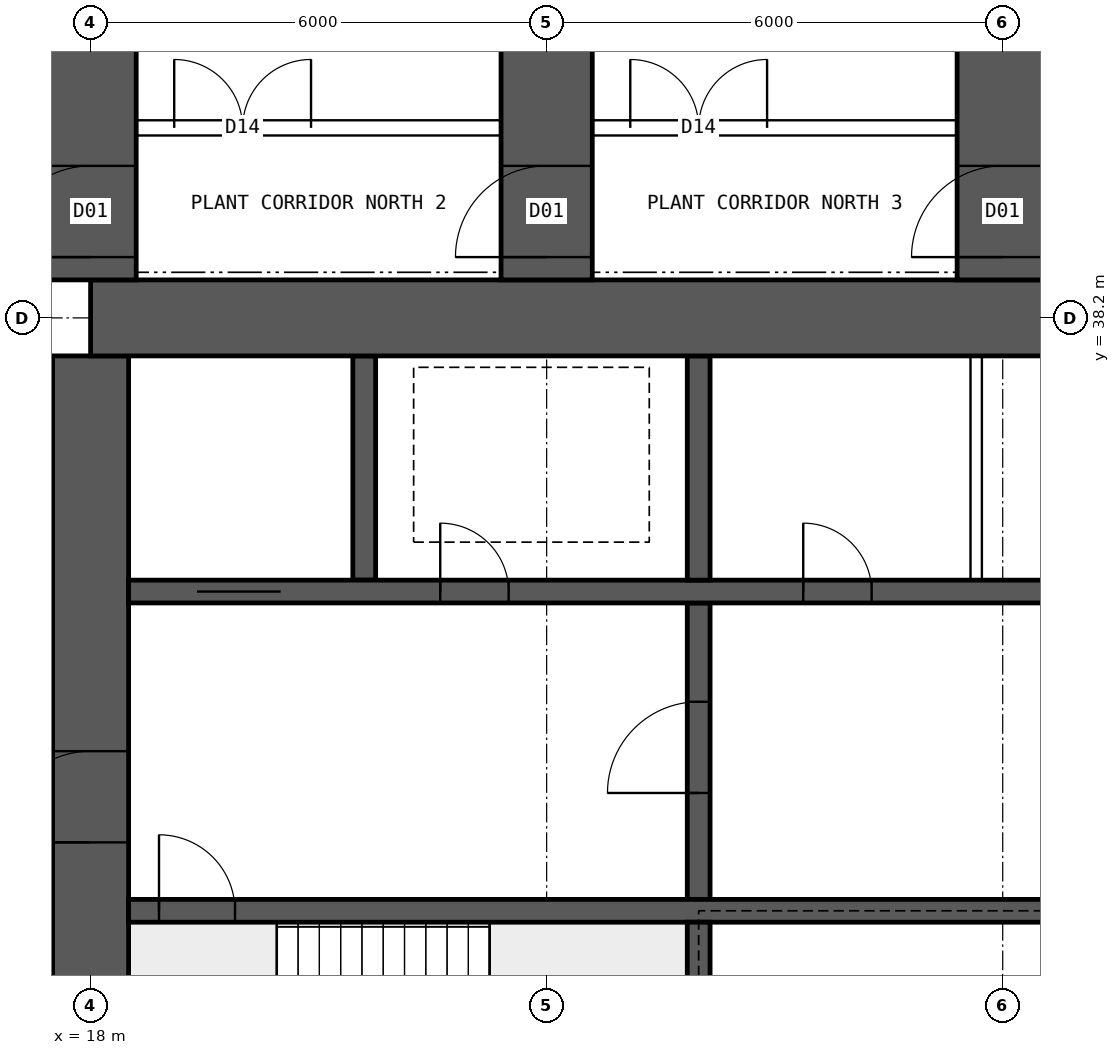
"""IFC4 building model, lengths in metres.
Left out: names, types, materials, properties, quantities, classifications, styles, units other than length and angle.
Written with IfcOpenShell. Run it as: python <this file> out.ifc"""

import sys

from ifc_helpers import new_model, si_unit, direction, frame, frame_2d, origin, place, context, subcontext, project, spatial, rectangle, extrude, element, fill, save


model = new_model("IFC4")
c1 = context("Model", 3, precision=1e-05, world=origin(), true_north=direction((0.0, 1.0)))
c2 = subcontext(c1, "Body", "Model", "MODEL_VIEW")
j1 = project(units=[si_unit("LENGTHUNIT", "METRE"), si_unit("PLANEANGLEUNIT", "RADIAN")], contexts=[c1])
p1 = place(None, origin())
s1 = spatial("IfcSite", under=j1, at=p1, CompositionType="ELEMENT")
p2 = place(p1, origin())
s2 = spatial("IfcBuilding", under=s1, at=p2, CompositionType="ELEMENT")
p3 = place(p2, frame((0.0, 0.0, 68.95)))
s3 = spatial("IfcBuildingStorey", under=s2, at=p3, CompositionType="ELEMENT", Elevation=68.95)
p4 = place(p3, frame((18.0, 38.2, 0.0), z_axis=(0.0, 0.0, 1.0), x_axis=(1.0, 0.0, 0.0)))
e1 = element("IfcWall", 1, at=p4, inside=s3, PredefinedType="SHEAR", context=c2, shape_type="SweptSolid", body=[
    extrude(rectangle(XDim=48.0, YDim=1.0, at=frame_2d((24.0, 0.0))), origin(), (0.0, 0.0, 1.0), 7.2),
])
p5 = place(p3, frame((18.0, 26.3, 0.0), z_axis=(0.0, 0.0, 1.0), x_axis=(0.0, 1.0, 0.0)))
e2 = element("IfcWall", 2, at=p5, inside=s3, PredefinedType="SHEAR", context=c2, shape_type="SweptSolid", body=[
    extrude(rectangle(XDim=11.4, YDim=1.0, at=frame_2d((5.7, 0.0))), origin(), (0.0, 0.0, 1.0), 7.2),
])
p6 = place(p5, frame((5.0, 0.0, 0.0)))
e3 = element("IfcOpeningElement", 3, at=p6, cuts=e2, PredefinedType="OPENING", context=c2, shape_type="SweptSolid", body=[
    extrude(rectangle(XDim=1.2, YDim=2.1, at=frame_2d((0.6, 1.05))), frame((0.0, 0.51, 0.0), z_axis=(0.0, -1.0, 0.0), x_axis=(1.0, 0.0, 0.0)), (0.0, 0.0, 1.0), 1.02),
])
p7 = place(p3, frame((18.5, 30.4, 0.0), z_axis=(0.0, 0.0, 1.0), x_axis=(1.0, 0.0, 0.0)))
e4 = element("IfcWall", 4, at=p7, inside=s3, PredefinedType="SHEAR", context=c2, shape_type="SweptSolid", body=[
    extrude(rectangle(XDim=47.0, YDim=0.3, at=frame_2d((23.5, 0.0))), origin(), (0.0, 0.0, 1.0), 7.2),
])
p8 = place(p7, frame((0.4, 0.0, 0.0)))
e5 = element("IfcOpeningElement", 5, at=p8, cuts=e4, PredefinedType="OPENING", context=c2, shape_type="SweptSolid", body=[
    extrude(rectangle(XDim=1.0, YDim=2.1, at=frame_2d((0.5, 1.05))), frame((0.0, 0.16, 0.0), z_axis=(0.0, -1.0, 0.0), x_axis=(1.0, 0.0, 0.0)), (0.0, 0.0, 1.0), 0.32),
])
p9 = place(p7, frame((45.6, 0.0, 0.0)))
e6 = element("IfcOpeningElement", 6, at=p9, cuts=e4, PredefinedType="OPENING", context=c2, shape_type="SweptSolid", body=[
    extrude(rectangle(XDim=1.0, YDim=2.1, at=frame_2d((0.5, 1.05))), frame((0.0, 0.16, 0.0), z_axis=(0.0, -1.0, 0.0), x_axis=(1.0, 0.0, 0.0)), (0.0, 0.0, 1.0), 0.32),
])
p10 = place(p7, frame((30.117, 0.0, 0.0)))
e7 = element("IfcOpeningElement", 7, at=p10, cuts=e4, PredefinedType="OPENING", context=c2, shape_type="SweptSolid", body=[
    extrude(rectangle(XDim=1.1, YDim=2.1, at=frame_2d((0.55, 1.05))), frame((0.0, 0.16, 0.0), z_axis=(0.0, -1.0, 0.0), x_axis=(1.0, 0.0, 0.0)), (0.0, 0.0, 1.0), 0.32),
])
p11 = place(p7, frame((33.65, 0.0, 0.0)))
e8 = element("IfcOpeningElement", 8, at=p11, cuts=e4, PredefinedType="OPENING", context=c2, shape_type="SweptSolid", body=[
    extrude(rectangle(XDim=1.1, YDim=2.1, at=frame_2d((0.55, 1.05))), frame((0.0, 0.16, 0.0), z_axis=(0.0, -1.0, 0.0), x_axis=(1.0, 0.0, 0.0)), (0.0, 0.0, 1.0), 0.32),
])
p12 = place(p7, frame((37.183, 0.0, 0.0)))
e9 = element("IfcOpeningElement", 9, at=p12, cuts=e4, PredefinedType="OPENING", context=c2, shape_type="SweptSolid", body=[
    extrude(rectangle(XDim=1.1, YDim=2.1, at=frame_2d((0.55, 1.05))), frame((0.0, 0.16, 0.0), z_axis=(0.0, -1.0, 0.0), x_axis=(1.0, 0.0, 0.0)), (0.0, 0.0, 1.0), 0.32),
])
p13 = place(p3, frame((18.5, 34.6, 0.0), z_axis=(0.0, 0.0, 1.0), x_axis=(1.0, 0.0, 0.0)))
e10 = element("IfcWall", 10, at=p13, inside=s3, PredefinedType="SHEAR", context=c2, shape_type="SweptSolid", body=[
    extrude(rectangle(XDim=47.0, YDim=0.3, at=frame_2d((23.5, 0.0))), origin(), (0.0, 0.0, 1.0), 7.2),
])
p14 = place(p13, frame((0.9, 0.0, 0.0)))
e11 = element("IfcOpeningElement", 11, at=p14, cuts=e10, PredefinedType="OPENING", context=c2, shape_type="SweptSolid", body=[
    extrude(rectangle(XDim=1.1, YDim=2.1, at=frame_2d((0.55, 1.05))), frame((0.0, 0.16, 0.0), z_axis=(0.0, -1.0, 0.0), x_axis=(1.0, 0.0, 0.0)), (0.0, 0.0, 1.0), 0.32),
])
p15 = place(p13, frame((45.0, 0.0, 0.0)))
e12 = element("IfcOpeningElement", 12, at=p15, cuts=e10, PredefinedType="OPENING", context=c2, shape_type="SweptSolid", body=[
    extrude(rectangle(XDim=1.1, YDim=2.1, at=frame_2d((0.55, 1.05))), frame((0.0, 0.16, 0.0), z_axis=(0.0, -1.0, 0.0), x_axis=(1.0, 0.0, 0.0)), (0.0, 0.0, 1.0), 0.32),
])
p16 = place(p13, frame((4.1, 0.0, 0.0)))
e13 = element("IfcOpeningElement", 13, at=p16, cuts=e10, PredefinedType="OPENING", context=c2, shape_type="SweptSolid", body=[
    extrude(rectangle(XDim=0.9, YDim=2.1, at=frame_2d((0.45, 1.05))), frame((0.0, 0.16, 0.0), z_axis=(0.0, -1.0, 0.0), x_axis=(1.0, 0.0, 0.0)), (0.0, 0.0, 1.0), 0.32),
])
p17 = place(p13, frame((42.0, 0.0, 0.0)))
e14 = element("IfcOpeningElement", 14, at=p17, cuts=e10, PredefinedType="OPENING", context=c2, shape_type="SweptSolid", body=[
    extrude(rectangle(XDim=0.9, YDim=2.1, at=frame_2d((0.45, 1.05))), frame((0.0, 0.16, 0.0), z_axis=(0.0, -1.0, 0.0), x_axis=(1.0, 0.0, 0.0)), (0.0, 0.0, 1.0), 0.32),
])
p18 = place(p13, frame((8.875, 0.0, 0.0)))
e15 = element("IfcOpeningElement", 15, at=p18, cuts=e10, PredefinedType="OPENING", context=c2, shape_type="SweptSolid", body=[
    extrude(rectangle(XDim=0.9, YDim=2.1, at=frame_2d((0.45, 1.05))), frame((0.0, 0.16, 0.0), z_axis=(0.0, -1.0, 0.0), x_axis=(1.0, 0.0, 0.0)), (0.0, 0.0, 1.0), 0.32),
])
p19 = place(p13, frame((12.849, 0.0, 0.0)))
e16 = element("IfcOpeningElement", 16, at=p19, cuts=e10, PredefinedType="OPENING", context=c2, shape_type="SweptSolid", body=[
    extrude(rectangle(XDim=0.9, YDim=2.1, at=frame_2d((0.45, 1.05))), frame((0.0, 0.16, 0.0), z_axis=(0.0, -1.0, 0.0), x_axis=(1.0, 0.0, 0.0)), (0.0, 0.0, 1.0), 0.32),
])
p20 = place(p13, frame((16.496, 0.0, 0.0)))
e17 = element("IfcOpeningElement", 17, at=p20, cuts=e10, PredefinedType="OPENING", context=c2, shape_type="SweptSolid", body=[
    extrude(rectangle(XDim=0.9, YDim=2.1, at=frame_2d((0.45, 1.05))), frame((0.0, 0.16, 0.0), z_axis=(0.0, -1.0, 0.0), x_axis=(1.0, 0.0, 0.0)), (0.0, 0.0, 1.0), 0.32),
])
p21 = place(p13, frame((20.255, 0.0, 0.0)))
e18 = element("IfcOpeningElement", 18, at=p21, cuts=e10, PredefinedType="OPENING", context=c2, shape_type="SweptSolid", body=[
    extrude(rectangle(XDim=0.9, YDim=2.1, at=frame_2d((0.45, 1.05))), frame((0.0, 0.16, 0.0), z_axis=(0.0, -1.0, 0.0), x_axis=(1.0, 0.0, 0.0)), (0.0, 0.0, 1.0), 0.32),
])
p22 = place(p13, frame((24.661, 0.0, 0.0)))
e19 = element("IfcOpeningElement", 19, at=p22, cuts=e10, PredefinedType="OPENING", context=c2, shape_type="SweptSolid", body=[
    extrude(rectangle(XDim=0.9, YDim=2.1, at=frame_2d((0.45, 1.05))), frame((0.0, 0.16, 0.0), z_axis=(0.0, -1.0, 0.0), x_axis=(1.0, 0.0, 0.0)), (0.0, 0.0, 1.0), 0.32),
])
p23 = place(p13, frame((27.458, 0.0, 0.0)))
e20 = element("IfcOpeningElement", 20, at=p23, cuts=e10, PredefinedType="OPENING", context=c2, shape_type="SweptSolid", body=[
    extrude(rectangle(XDim=0.9, YDim=2.1, at=frame_2d((0.45, 1.05))), frame((0.0, 0.16, 0.0), z_axis=(0.0, -1.0, 0.0), x_axis=(1.0, 0.0, 0.0)), (0.0, 0.0, 1.0), 0.32),
])
p24 = place(p13, frame((29.831, 0.0, 0.0)))
e21 = element("IfcOpeningElement", 21, at=p24, cuts=e10, PredefinedType="OPENING", context=c2, shape_type="SweptSolid", body=[
    extrude(rectangle(XDim=0.9, YDim=2.1, at=frame_2d((0.45, 1.05))), frame((0.0, 0.16, 0.0), z_axis=(0.0, -1.0, 0.0), x_axis=(1.0, 0.0, 0.0)), (0.0, 0.0, 1.0), 0.32),
])
p25 = place(p13, frame((33.68, 0.0, 0.0)))
e22 = element("IfcOpeningElement", 22, at=p25, cuts=e10, PredefinedType="OPENING", context=c2, shape_type="SweptSolid", body=[
    extrude(rectangle(XDim=0.9, YDim=2.1, at=frame_2d((0.45, 1.05))), frame((0.0, 0.16, 0.0), z_axis=(0.0, -1.0, 0.0), x_axis=(1.0, 0.0, 0.0)), (0.0, 0.0, 1.0), 0.32),
])
p26 = place(p13, frame((37.429, 0.0, 0.0)))
e23 = element("IfcOpeningElement", 23, at=p26, cuts=e10, PredefinedType="OPENING", context=c2, shape_type="SweptSolid", body=[
    extrude(rectangle(XDim=0.9, YDim=2.1, at=frame_2d((0.45, 1.05))), frame((0.0, 0.16, 0.0), z_axis=(0.0, -1.0, 0.0), x_axis=(1.0, 0.0, 0.0)), (0.0, 0.0, 1.0), 0.32),
])
p27 = place(p3, frame((26.0, 26.3, 0.0), z_axis=(0.0, 0.0, 1.0), x_axis=(0.0, 1.0, 0.0)))
e24 = element("IfcWall", 24, at=p27, inside=s3, PredefinedType="SHEAR", context=c2, shape_type="SweptSolid", body=[
    extrude(rectangle(XDim=3.95, YDim=0.3, at=frame_2d((1.975, 0.0))), origin(), (0.0, 0.0, 1.0), 7.2),
])
p28 = place(p3, frame((26.0, 30.55, 0.0), z_axis=(0.0, 0.0, 1.0), x_axis=(0.0, 1.0, 0.0)))
e25 = element("IfcWall", 25, at=p28, inside=s3, PredefinedType="SHEAR", context=c2, shape_type="SweptSolid", body=[
    extrude(rectangle(XDim=3.9, YDim=0.3, at=frame_2d((1.95, 0.0))), origin(), (0.0, 0.0, 1.0), 7.2),
])
p29 = place(p28, frame((1.4, 0.0, 0.0)))
e26 = element("IfcOpeningElement", 26, at=p29, cuts=e25, PredefinedType="OPENING", context=c2, shape_type="SweptSolid", body=[
    extrude(rectangle(XDim=1.2, YDim=2.1, at=frame_2d((0.6, 1.05))), frame((0.0, 0.16, 0.0), z_axis=(0.0, -1.0, 0.0), x_axis=(1.0, 0.0, 0.0)), (0.0, 0.0, 1.0), 0.32),
])
for number, where, z_axis, x_axis in (
    (27, (21.6, 34.75, 0.0), (0.0, 0.0, 1.0), (0.0, 1.0, 0.0)),
    (28, (26.0, 34.75, 0.0), (0.0, 0.0, 1.0), (0.0, 1.0, 0.0)),
):
    element("IfcWall", number, at=place(p3, frame(where, z_axis=z_axis, x_axis=x_axis)), inside=s3, PredefinedType="SHEAR", context=c2, shape_type="SweptSolid", body=[
        extrude(rectangle(XDim=2.95, YDim=0.3, at=frame_2d((1.475, 0.0))), origin(), (0.0, 0.0, 1.0), 7.2),
    ])
p30 = place(p3, frame((18.0, 38.7, 0.0), z_axis=(0.0, 0.0, 1.0), x_axis=(0.0, 1.0, 0.0)))
e29 = element("IfcWall", 29, at=p30, inside=s3, PredefinedType="SHEAR", context=c2, shape_type="SweptSolid", body=[
    extrude(rectangle(XDim=17.6, YDim=1.2, at=frame_2d((8.8, 0.0))), origin(), (0.0, 0.0, 1.0), 7.2),
])
p31 = place(p30, frame((0.3, 0.0, 0.0)))
e30 = element("IfcOpeningElement", 30, at=p31, cuts=e29, PredefinedType="OPENING", context=c2, shape_type="SweptSolid", body=[
    extrude(rectangle(XDim=1.2, YDim=2.1, at=frame_2d((0.6, 1.05))), frame((0.0, 0.61, 0.0), z_axis=(0.0, -1.0, 0.0), x_axis=(1.0, 0.0, 0.0)), (0.0, 0.0, 1.0), 1.22),
])
p32 = place(p3, frame((24.0, 38.7, 0.0), z_axis=(0.0, 0.0, 1.0), x_axis=(0.0, 1.0, 0.0)))
e31 = element("IfcWall", 31, at=p32, inside=s3, PredefinedType="SHEAR", context=c2, shape_type="SweptSolid", body=[
    extrude(rectangle(XDim=17.6, YDim=1.2, at=frame_2d((8.8, 0.0))), origin(), (0.0, 0.0, 1.0), 7.2),
])
p33 = place(p32, frame((0.3, 0.0, 0.0)))
e32 = element("IfcOpeningElement", 32, at=p33, cuts=e31, PredefinedType="OPENING", context=c2, shape_type="SweptSolid", body=[
    extrude(rectangle(XDim=1.2, YDim=2.1, at=frame_2d((0.6, 1.05))), frame((0.0, 0.61, 0.0), z_axis=(0.0, -1.0, 0.0), x_axis=(1.0, 0.0, 0.0)), (0.0, 0.0, 1.0), 1.22),
])
p34 = place(p3, frame((30.0, 38.7, 0.0), z_axis=(0.0, 0.0, 1.0), x_axis=(0.0, 1.0, 0.0)))
e33 = element("IfcWall", 33, at=p34, inside=s3, PredefinedType="SHEAR", context=c2, shape_type="SweptSolid", body=[
    extrude(rectangle(XDim=17.6, YDim=1.2, at=frame_2d((8.8, 0.0))), origin(), (0.0, 0.0, 1.0), 7.2),
])
p35 = place(p34, frame((0.3, 0.0, 0.0)))
e34 = element("IfcOpeningElement", 34, at=p35, cuts=e33, PredefinedType="OPENING", context=c2, shape_type="SweptSolid", body=[
    extrude(rectangle(XDim=1.2, YDim=2.1, at=frame_2d((0.6, 1.05))), frame((0.0, 0.61, 0.0), z_axis=(0.0, -1.0, 0.0), x_axis=(1.0, 0.0, 0.0)), (0.0, 0.0, 1.0), 1.22),
])
p36 = place(p3, frame((29.651, 34.75, 0.0), z_axis=(0.0, 0.0, 1.0), x_axis=(0.0, 1.0, 0.0)))
e35 = element("IfcWall", 35, at=p36, inside=s3, PredefinedType="SOLIDWALL", context=c2, shape_type="SweptSolid", body=[
    extrude(rectangle(XDim=2.95, YDim=0.15, at=frame_2d((1.475, 0.0))), origin(), (0.0, 0.0, 1.0), 6.9),
])
p37 = place(p3, frame((15.6, 40.7, 0.0), z_axis=(0.0, 0.0, 1.0), x_axis=(1.0, 0.0, 0.0)))
e36 = element("IfcWall", 36, at=p37, inside=s3, PredefinedType="SOLIDWALL", context=c2, shape_type="SweptSolid", body=[
    extrude(rectangle(XDim=52.8, YDim=0.2, at=frame_2d((26.4, 0.0))), origin(), (0.0, 0.0, 1.0), 6.9),
])
p38 = place(p37, frame((0.6, 0.0, 0.0)))
e37 = element("IfcOpeningElement", 37, at=p38, cuts=e36, PredefinedType="OPENING", context=c2, shape_type="SweptSolid", body=[
    extrude(rectangle(XDim=1.2, YDim=2.1, at=frame_2d((0.6, 1.05))), frame((0.0, 0.11, 0.0), z_axis=(0.0, -1.0, 0.0), x_axis=(1.0, 0.0, 0.0)), (0.0, 0.0, 1.0), 0.22),
])
p39 = place(p37, frame((3.5, 0.0, 0.0)))
e38 = element("IfcOpeningElement", 38, at=p39, cuts=e36, PredefinedType="OPENING", context=c2, shape_type="SweptSolid", body=[
    extrude(rectangle(XDim=1.8, YDim=2.4, at=frame_2d((0.9, 1.2))), frame((0.0, 0.11, 0.0), z_axis=(0.0, -1.0, 0.0), x_axis=(1.0, 0.0, 0.0)), (0.0, 0.0, 1.0), 0.22),
])
p40 = place(p37, frame((9.5, 0.0, 0.0)))
e39 = element("IfcOpeningElement", 39, at=p40, cuts=e36, PredefinedType="OPENING", context=c2, shape_type="SweptSolid", body=[
    extrude(rectangle(XDim=1.8, YDim=2.4, at=frame_2d((0.9, 1.2))), frame((0.0, 0.11, 0.0), z_axis=(0.0, -1.0, 0.0), x_axis=(1.0, 0.0, 0.0)), (0.0, 0.0, 1.0), 0.22),
])
p41 = place(p37, frame((15.5, 0.0, 0.0)))
e40 = element("IfcOpeningElement", 40, at=p41, cuts=e36, PredefinedType="OPENING", context=c2, shape_type="SweptSolid", body=[
    extrude(rectangle(XDim=1.8, YDim=2.4, at=frame_2d((0.9, 1.2))), frame((0.0, 0.11, 0.0), z_axis=(0.0, -1.0, 0.0), x_axis=(1.0, 0.0, 0.0)), (0.0, 0.0, 1.0), 0.22),
])
p42 = place(p37, frame((21.5, 0.0, 0.0)))
e41 = element("IfcOpeningElement", 41, at=p42, cuts=e36, PredefinedType="OPENING", context=c2, shape_type="SweptSolid", body=[
    extrude(rectangle(XDim=1.8, YDim=2.4, at=frame_2d((0.9, 1.2))), frame((0.0, 0.11, 0.0), z_axis=(0.0, -1.0, 0.0), x_axis=(1.0, 0.0, 0.0)), (0.0, 0.0, 1.0), 0.22),
])
p43 = place(p37, frame((27.5, 0.0, 0.0)))
e42 = element("IfcOpeningElement", 42, at=p43, cuts=e36, PredefinedType="OPENING", context=c2, shape_type="SweptSolid", body=[
    extrude(rectangle(XDim=1.8, YDim=2.4, at=frame_2d((0.9, 1.2))), frame((0.0, 0.11, 0.0), z_axis=(0.0, -1.0, 0.0), x_axis=(1.0, 0.0, 0.0)), (0.0, 0.0, 1.0), 0.22),
])
p44 = place(p37, frame((33.5, 0.0, 0.0)))
e43 = element("IfcOpeningElement", 43, at=p44, cuts=e36, PredefinedType="OPENING", context=c2, shape_type="SweptSolid", body=[
    extrude(rectangle(XDim=1.8, YDim=2.4, at=frame_2d((0.9, 1.2))), frame((0.0, 0.11, 0.0), z_axis=(0.0, -1.0, 0.0), x_axis=(1.0, 0.0, 0.0)), (0.0, 0.0, 1.0), 0.22),
])
p45 = place(p37, frame((39.5, 0.0, 0.0)))
e44 = element("IfcOpeningElement", 44, at=p45, cuts=e36, PredefinedType="OPENING", context=c2, shape_type="SweptSolid", body=[
    extrude(rectangle(XDim=1.8, YDim=2.4, at=frame_2d((0.9, 1.2))), frame((0.0, 0.11, 0.0), z_axis=(0.0, -1.0, 0.0), x_axis=(1.0, 0.0, 0.0)), (0.0, 0.0, 1.0), 0.22),
])
p46 = place(p37, frame((45.5, 0.0, 0.0)))
e45 = element("IfcOpeningElement", 45, at=p46, cuts=e36, PredefinedType="OPENING", context=c2, shape_type="SweptSolid", body=[
    extrude(rectangle(XDim=1.8, YDim=2.4, at=frame_2d((0.9, 1.2))), frame((0.0, 0.11, 0.0), z_axis=(0.0, -1.0, 0.0), x_axis=(1.0, 0.0, 0.0)), (0.0, 0.0, 1.0), 0.22),
])
p47 = place(p37, frame((51.5, 0.0, 0.0)))
e46 = element("IfcOpeningElement", 46, at=p47, cuts=e36, PredefinedType="OPENING", context=c2, shape_type="SweptSolid", body=[
    extrude(rectangle(XDim=1.2, YDim=2.1, at=frame_2d((0.6, 1.05))), frame((0.0, 0.11, 0.0), z_axis=(0.0, -1.0, 0.0), x_axis=(1.0, 0.0, 0.0)), (0.0, 0.0, 1.0), 0.22),
])
p48 = place(p6, origin())
e47 = element("IfcDoor", 47, at=p48, inside=s3, OperationType="SINGLE_SWING_LEFT", PredefinedType="DOOR", context=c2, shape_type="SweptSolid", body=[
    extrude(rectangle(XDim=1.2, YDim=2.1, at=frame_2d((0.6, 1.05))), frame((0.0, 0.025, 0.0), z_axis=(0.0, -1.0, 0.0), x_axis=(1.0, 0.0, 0.0)), (0.0, 0.0, 1.0), 0.05),
])
fill(e3, e47)
p49 = place(p8, origin())
e48 = element("IfcDoor", 48, at=p49, inside=s3, OperationType="SINGLE_SWING_LEFT", PredefinedType="DOOR", context=c2, shape_type="SweptSolid", body=[
    extrude(rectangle(XDim=1.0, YDim=2.1, at=frame_2d((0.5, 1.05))), frame((0.0, 0.025, 0.0), z_axis=(0.0, -1.0, 0.0), x_axis=(1.0, 0.0, 0.0)), (0.0, 0.0, 1.0), 0.05),
])
fill(e5, e48)
p50 = place(p14, origin())
e49 = element("IfcDoor", 49, at=p50, inside=s3, OperationType="DOUBLE_DOOR_SLIDING", PredefinedType="DOOR", context=c2, shape_type="SweptSolid", body=[
    extrude(rectangle(XDim=1.1, YDim=2.1, at=frame_2d((0.55, 1.05))), frame((0.0, 0.025, 0.0), z_axis=(0.0, -1.0, 0.0), x_axis=(1.0, 0.0, 0.0)), (0.0, 0.0, 1.0), 0.05),
])
fill(e11, e49)
p51 = place(p16, origin())
e50 = element("IfcDoor", 50, at=p51, inside=s3, OperationType="SINGLE_SWING_LEFT", PredefinedType="DOOR", context=c2, shape_type="SweptSolid", body=[
    extrude(rectangle(XDim=0.9, YDim=2.1, at=frame_2d((0.45, 1.05))), frame((0.0, 0.025, 0.0), z_axis=(0.0, -1.0, 0.0), x_axis=(1.0, 0.0, 0.0)), (0.0, 0.0, 1.0), 0.05),
])
fill(e13, e50)
p52 = place(p29, origin())
e51 = element("IfcDoor", 51, at=p52, inside=s3, OperationType="SINGLE_SWING_LEFT", PredefinedType="DOOR", context=c2, shape_type="SweptSolid", body=[
    extrude(rectangle(XDim=1.2, YDim=2.1, at=frame_2d((0.6, 1.05))), frame((0.0, 0.025, 0.0), z_axis=(0.0, -1.0, 0.0), x_axis=(1.0, 0.0, 0.0)), (0.0, 0.0, 1.0), 0.05),
])
fill(e26, e51)
p53 = place(p18, origin())
e52 = element("IfcDoor", 52, at=p53, inside=s3, OperationType="SINGLE_SWING_LEFT", PredefinedType="DOOR", context=c2, shape_type="SweptSolid", body=[
    extrude(rectangle(XDim=0.9, YDim=2.1, at=frame_2d((0.45, 1.05))), frame((0.0, 0.025, 0.0), z_axis=(0.0, -1.0, 0.0), x_axis=(1.0, 0.0, 0.0)), (0.0, 0.0, 1.0), 0.05),
])
fill(e15, e52)
p54 = place(p39, origin())
e53 = element("IfcDoor", 53, at=p54, inside=s3, OperationType="DOUBLE_DOOR_SINGLE_SWING", PredefinedType="DOOR", context=c2, shape_type="SweptSolid", body=[
    extrude(rectangle(XDim=1.8, YDim=2.4, at=frame_2d((0.9, 1.2))), frame((0.0, 0.025, 0.0), z_axis=(0.0, -1.0, 0.0), x_axis=(1.0, 0.0, 0.0)), (0.0, 0.0, 1.0), 0.05),
])
fill(e38, e53)
p55 = place(p40, origin())
e54 = element("IfcDoor", 54, at=p55, inside=s3, OperationType="DOUBLE_DOOR_SINGLE_SWING", PredefinedType="DOOR", context=c2, shape_type="SweptSolid", body=[
    extrude(rectangle(XDim=1.8, YDim=2.4, at=frame_2d((0.9, 1.2))), frame((0.0, 0.025, 0.0), z_axis=(0.0, -1.0, 0.0), x_axis=(1.0, 0.0, 0.0)), (0.0, 0.0, 1.0), 0.05),
])
fill(e39, e54)
p56 = place(p31, origin())
e55 = element("IfcDoor", 55, at=p56, inside=s3, OperationType="SINGLE_SWING_LEFT", PredefinedType="DOOR", context=c2, shape_type="SweptSolid", body=[
    extrude(rectangle(XDim=1.2, YDim=2.1, at=frame_2d((0.6, 1.05))), frame((0.0, 0.025, 0.0), z_axis=(0.0, -1.0, 0.0), x_axis=(1.0, 0.0, 0.0)), (0.0, 0.0, 1.0), 0.05),
])
fill(e30, e55)
p57 = place(p33, origin())
e56 = element("IfcDoor", 56, at=p57, inside=s3, OperationType="SINGLE_SWING_LEFT", PredefinedType="DOOR", context=c2, shape_type="SweptSolid", body=[
    extrude(rectangle(XDim=1.2, YDim=2.1, at=frame_2d((0.6, 1.05))), frame((0.0, 0.025, 0.0), z_axis=(0.0, -1.0, 0.0), x_axis=(1.0, 0.0, 0.0)), (0.0, 0.0, 1.0), 0.05),
])
fill(e32, e56)
p58 = place(p35, origin())
e57 = element("IfcDoor", 57, at=p58, inside=s3, OperationType="SINGLE_SWING_LEFT", PredefinedType="DOOR", context=c2, shape_type="SweptSolid", body=[
    extrude(rectangle(XDim=1.2, YDim=2.1, at=frame_2d((0.6, 1.05))), frame((0.0, 0.025, 0.0), z_axis=(0.0, -1.0, 0.0), x_axis=(1.0, 0.0, 0.0)), (0.0, 0.0, 1.0), 0.05),
])
fill(e34, e57)
save(model, sys.argv[1])
